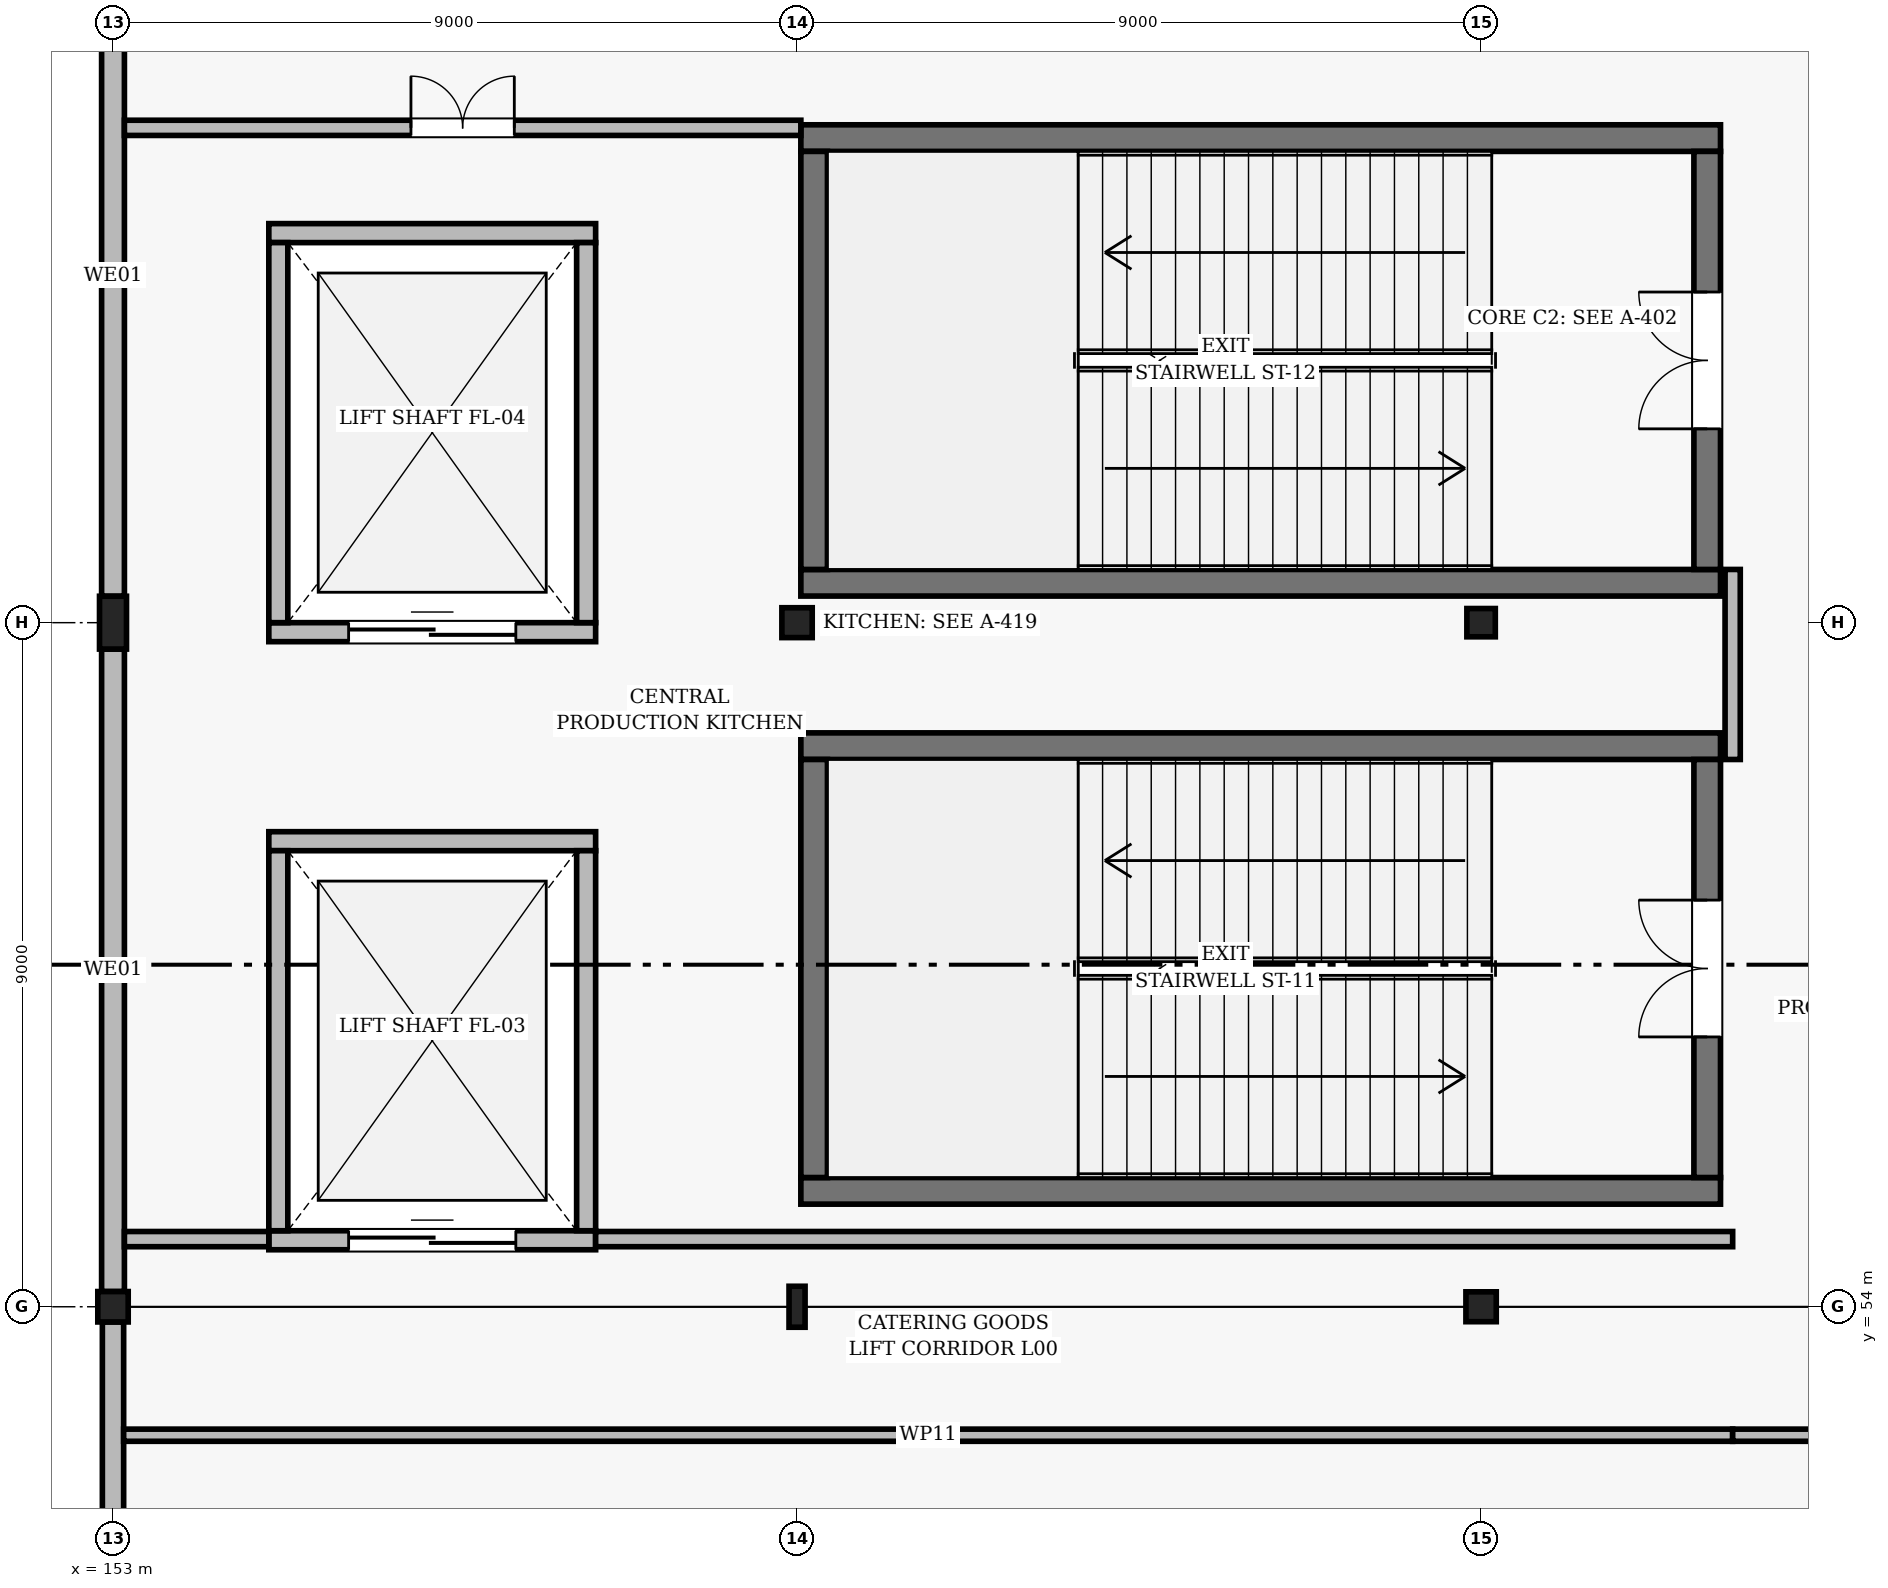
"""IFC4 building model, lengths in metres.
Left out: names, types, materials, properties, quantities, classifications, styles, units other than length and angle.
Written with IfcOpenShell. Run it as: python <this file> out.ifc"""

import sys

from ifc_helpers import new_model, si_unit, direction, frame, frame_2d, origin, origin_2d, place, context, subcontext, project, spatial, rectangle, hollow_rectangle, i_section, extrude, element, fill, save


model = new_model("IFC4")
c1 = context("Model", 3, precision=1e-05, world=origin(), true_north=direction((0.0, 1.0)))
c2 = subcontext(c1, "Body", "Model", "MODEL_VIEW")
j1 = project(units=[si_unit("LENGTHUNIT", "METRE"), si_unit("PLANEANGLEUNIT", "RADIAN")], contexts=[c1])
p1 = place(None, origin())
s1 = spatial("IfcSite", under=j1, at=p1, CompositionType="ELEMENT")
p2 = place(p1, origin())
s2 = spatial("IfcBuilding", under=s1, at=p2, CompositionType="ELEMENT")
p3 = place(p2, origin())
s3 = spatial("IfcBuildingStorey", under=s2, at=p3, CompositionType="ELEMENT", Elevation=0.0)
p4 = place(p3, frame((153.0, 54.0, 0.0), z_axis=(0.0, 0.0, 1.0), x_axis=(1.0, 0.0, 0.0)))
e1 = element("IfcColumn", 1, at=p4, inside=s3, PredefinedType="COLUMN", context=c2, shape_type="SweptSolid", body=[
    extrude(hollow_rectangle(XDim=0.4, YDim=0.4, WallThickness=0.016, InnerFilletRadius=0.016, OuterFilletRadius=0.032, at=origin_2d()), origin(), (0.0, 0.0, 1.0), 5.4),
])
p5 = place(p3, frame((153.0, 63.0, 0.0), z_axis=(0.0, 0.0, 1.0), x_axis=(1.0, 0.0, 0.0)))
e2 = element("IfcColumn", 2, at=p5, inside=s3, PredefinedType="COLUMN", context=c2, shape_type="SweptSolid", body=[
    extrude(i_section(OverallWidth=0.355, OverallDepth=0.695, WebThickness=0.015, FlangeThickness=0.025, FilletRadius=0.018, at=origin_2d()), origin(), (0.0, 0.0, 1.0), 5.4),
])
p6 = place(p3, frame((162.0, 54.0, 0.0), z_axis=(0.0, 0.0, 1.0), x_axis=(1.0, 0.0, 0.0)))
e3 = element("IfcColumn", 3, at=p6, inside=s3, PredefinedType="COLUMN", context=c2, shape_type="SweptSolid", body=[
    extrude(i_section(OverallWidth=0.211, OverallDepth=0.539, WebThickness=0.012, FlangeThickness=0.019, FilletRadius=0.014, at=origin_2d()), origin(), (0.0, 0.0, 1.0), 5.4),
])
for number, where, z_axis, x_axis in (
    (4, (162.0, 63.0, 0.0), (0.0, 0.0, 1.0), (1.0, 0.0, 0.0)),
    (5, (171.0, 54.0, 0.0), (0.0, 0.0, 1.0), (1.0, 0.0, 0.0)),
):
    element("IfcColumn", number, at=place(p3, frame(where, z_axis=z_axis, x_axis=x_axis)), inside=s3, PredefinedType="COLUMN", context=c2, shape_type="SweptSolid", body=[
        extrude(i_section(OverallWidth=0.399, OverallDepth=0.393, WebThickness=0.023, FlangeThickness=0.037, FilletRadius=0.018, at=origin_2d()), origin(), (0.0, 0.0, 1.0), 5.4),
    ])
p7 = place(p3, frame((171.0, 63.0, 0.0), z_axis=(0.0, 0.0, 1.0), x_axis=(1.0, 0.0, 0.0)))
e6 = element("IfcColumn", 6, at=p7, inside=s3, PredefinedType="COLUMN", context=c2, shape_type="SweptSolid", body=[
    extrude(i_section(OverallWidth=0.374, OverallDepth=0.372, WebThickness=0.016, FlangeThickness=0.026, FilletRadius=0.016, at=origin_2d()), origin(), (0.0, 0.0, 1.0), 5.4),
])
p8 = place(p3, frame((153.0, 45.55, 0.0), z_axis=(0.0, 0.0, 1.0), x_axis=(0.0, 1.0, 0.0)))
e7 = element("IfcWall", 7, at=p8, inside=s3, PredefinedType="SOLIDWALL", context=c2, shape_type="SweptSolid", body=[
    extrude(rectangle(XDim=8.25, YDim=0.28, at=frame_2d((4.125, 0.0))), origin(), (0.0, 0.0, 1.0), 4.554),
])
p9 = place(p8, frame((2.915, 0.0, 0.0)))
e8 = element("IfcOpeningElement", 8, at=p9, cuts=e7, PredefinedType="OPENING", context=c2, shape_type="SweptSolid", body=[
    extrude(rectangle(XDim=2.42, YDim=2.4, at=frame_2d((1.21, 1.2))), frame((0.0, 0.15, 0.0), z_axis=(0.0, -1.0, 0.0), x_axis=(1.0, 0.0, 0.0)), (0.0, 0.0, 1.0), 0.3),
])
p10 = place(p3, frame((153.0, 54.2, 0.0), z_axis=(0.0, 0.0, 1.0), x_axis=(0.0, 1.0, 0.0)))
e9 = element("IfcWall", 9, at=p10, inside=s3, PredefinedType="SOLIDWALL", context=c2, shape_type="SweptSolid", body=[
    extrude(rectangle(XDim=8.453, YDim=0.3, at=frame_2d((4.226, 0.0))), origin(), (0.0, 0.0, 1.0), 4.392),
])
p11 = place(p3, frame((153.0, 63.347, 0.0), z_axis=(0.0, 0.0, 1.0), x_axis=(0.0, 1.0, 0.0)))
e10 = element("IfcWall", 10, at=p11, inside=s3, PredefinedType="SOLIDWALL", context=c2, shape_type="SweptSolid", body=[
    extrude(rectangle(XDim=8.44, YDim=0.3, at=frame_2d((4.22, 0.0))), origin(), (0.0, 0.0, 1.0), 4.47),
])
for number, where, z_axis, x_axis in (
    (11, (162.05, 55.525, 0.0), (0.0, 0.0, 1.0), (1.0, 0.0, 0.0)),
    (12, (174.15, 61.375, 0.0), (0.0, 0.0, 1.0), (-1.0, 0.0, 0.0)),
):
    element("IfcWall", number, at=place(p3, frame(where, z_axis=z_axis, x_axis=x_axis)), inside=s3, PredefinedType="SHEAR", context=c2, shape_type="SweptSolid", body=[
        extrude(rectangle(XDim=12.1, YDim=0.35, at=frame_2d((6.05, 0.0))), origin(), (0.0, 0.0, 1.0), 5.18),
    ])
p12 = place(p3, frame((162.225, 61.2, 0.0), z_axis=(0.0, 0.0, 1.0), x_axis=(0.0, -1.0, 0.0)))
e13 = element("IfcWall", 13, at=p12, inside=s3, PredefinedType="SHEAR", context=c2, shape_type="SweptSolid", body=[
    extrude(rectangle(XDim=5.5, YDim=0.35, at=frame_2d((2.75, 0.0))), origin(), (0.0, 0.0, 1.0), 5.18),
])
p13 = place(p3, frame((173.975, 55.7, 0.0), z_axis=(0.0, 0.0, 1.0), x_axis=(0.0, 1.0, 0.0)))
e14 = element("IfcWall", 14, at=p13, inside=s3, PredefinedType="SHEAR", context=c2, shape_type="SweptSolid", body=[
    extrude(rectangle(XDim=5.5, YDim=0.35, at=frame_2d((2.75, 0.0))), origin(), (0.0, 0.0, 1.0), 5.18),
])
p14 = place(p13, frame((1.85, 0.0, 0.0)))
e15 = element("IfcOpeningElement", 15, at=p14, cuts=e14, PredefinedType="OPENING", context=c2, shape_type="SweptSolid", body=[
    extrude(rectangle(XDim=1.8, YDim=2.2, at=frame_2d((0.9, 1.1))), frame((0.0, 0.185, 0.0), z_axis=(0.0, -1.0, 0.0), x_axis=(1.0, 0.0, 0.0)), (0.0, 0.0, 1.0), 0.37),
])
for number, where, z_axis, x_axis in (
    (16, (162.05, 63.525, 0.0), (0.0, 0.0, 1.0), (1.0, 0.0, 0.0)),
    (17, (174.15, 69.375, 0.0), (0.0, 0.0, 1.0), (-1.0, 0.0, 0.0)),
):
    element("IfcWall", number, at=place(p3, frame(where, z_axis=z_axis, x_axis=x_axis)), inside=s3, PredefinedType="SHEAR", context=c2, shape_type="SweptSolid", body=[
        extrude(rectangle(XDim=12.1, YDim=0.35, at=frame_2d((6.05, 0.0))), origin(), (0.0, 0.0, 1.0), 5.18),
    ])
p15 = place(p3, frame((162.225, 69.2, 0.0), z_axis=(0.0, 0.0, 1.0), x_axis=(0.0, -1.0, 0.0)))
e18 = element("IfcWall", 18, at=p15, inside=s3, PredefinedType="SHEAR", context=c2, shape_type="SweptSolid", body=[
    extrude(rectangle(XDim=5.5, YDim=0.35, at=frame_2d((2.75, 0.0))), origin(), (0.0, 0.0, 1.0), 5.18),
])
p16 = place(p3, frame((173.975, 63.7, 0.0), z_axis=(0.0, 0.0, 1.0), x_axis=(0.0, 1.0, 0.0)))
e19 = element("IfcWall", 19, at=p16, inside=s3, PredefinedType="SHEAR", context=c2, shape_type="SweptSolid", body=[
    extrude(rectangle(XDim=5.5, YDim=0.35, at=frame_2d((2.75, 0.0))), origin(), (0.0, 0.0, 1.0), 5.18),
])
p17 = place(p16, frame((1.85, 0.0, 0.0)))
e20 = element("IfcOpeningElement", 20, at=p17, cuts=e19, PredefinedType="OPENING", context=c2, shape_type="SweptSolid", body=[
    extrude(rectangle(XDim=1.8, YDim=2.2, at=frame_2d((0.9, 1.1))), frame((0.0, 0.185, 0.0), z_axis=(0.0, -1.0, 0.0), x_axis=(1.0, 0.0, 0.0)), (0.0, 0.0, 1.0), 0.37),
])
p18 = place(p3, frame((155.05, 54.875, 0.0), z_axis=(0.0, 0.0, 1.0), x_axis=(1.0, 0.0, 0.0)))
e21 = element("IfcWall", 21, at=p18, inside=s3, PredefinedType="SOLIDWALL", context=c2, shape_type="SweptSolid", body=[
    extrude(rectangle(XDim=4.3, YDim=0.25, at=frame_2d((2.15, 0.0))), origin(), (0.0, 0.0, 1.0), 5.18),
])
p19 = place(p18, frame((1.05, 0.0, 0.0)))
e22 = element("IfcOpeningElement", 22, at=p19, cuts=e21, PredefinedType="OPENING", context=c2, shape_type="SweptSolid", body=[
    extrude(rectangle(XDim=2.2, YDim=2.5, at=frame_2d((1.1, 1.25))), frame((0.0, 0.135, 0.0), z_axis=(0.0, -1.0, 0.0), x_axis=(1.0, 0.0, 0.0)), (0.0, 0.0, 1.0), 0.27),
])
p20 = place(p3, frame((159.35, 60.125, 0.0), z_axis=(0.0, 0.0, 1.0), x_axis=(-1.0, 0.0, 0.0)))
e23 = element("IfcWall", 23, at=p20, inside=s3, PredefinedType="SOLIDWALL", context=c2, shape_type="SweptSolid", body=[
    extrude(rectangle(XDim=4.3, YDim=0.25, at=frame_2d((2.15, 0.0))), origin(), (0.0, 0.0, 1.0), 5.18),
])
for number, where, z_axis, x_axis in (
    (24, (155.175, 60.0, 0.0), (0.0, 0.0, 1.0), (0.0, -1.0, 0.0)),
    (25, (159.225, 55.0, 0.0), (0.0, 0.0, 1.0), (0.0, 1.0, 0.0)),
):
    element("IfcWall", number, at=place(p3, frame(where, z_axis=z_axis, x_axis=x_axis)), inside=s3, PredefinedType="SOLIDWALL", context=c2, shape_type="SweptSolid", body=[
        extrude(rectangle(XDim=5.0, YDim=0.25, at=frame_2d((2.5, 0.0))), origin(), (0.0, 0.0, 1.0), 5.18),
    ])
p21 = place(p3, frame((155.05, 62.875, 0.0), z_axis=(0.0, 0.0, 1.0), x_axis=(1.0, 0.0, 0.0)))
e26 = element("IfcWall", 26, at=p21, inside=s3, PredefinedType="SOLIDWALL", context=c2, shape_type="SweptSolid", body=[
    extrude(rectangle(XDim=4.3, YDim=0.25, at=frame_2d((2.15, 0.0))), origin(), (0.0, 0.0, 1.0), 5.18),
])
p22 = place(p21, frame((1.05, 0.0, 0.0)))
e27 = element("IfcOpeningElement", 27, at=p22, cuts=e26, PredefinedType="OPENING", context=c2, shape_type="SweptSolid", body=[
    extrude(rectangle(XDim=2.2, YDim=2.5, at=frame_2d((1.1, 1.25))), frame((0.0, 0.135, 0.0), z_axis=(0.0, -1.0, 0.0), x_axis=(1.0, 0.0, 0.0)), (0.0, 0.0, 1.0), 0.27),
])
p23 = place(p3, frame((159.35, 68.125, 0.0), z_axis=(0.0, 0.0, 1.0), x_axis=(-1.0, 0.0, 0.0)))
e28 = element("IfcWall", 28, at=p23, inside=s3, PredefinedType="SOLIDWALL", context=c2, shape_type="SweptSolid", body=[
    extrude(rectangle(XDim=4.3, YDim=0.25, at=frame_2d((2.15, 0.0))), origin(), (0.0, 0.0, 1.0), 5.18),
])
for number, where, z_axis, x_axis in (
    (29, (155.175, 68.0, 0.0), (0.0, 0.0, 1.0), (0.0, -1.0, 0.0)),
    (30, (159.225, 63.0, 0.0), (0.0, 0.0, 1.0), (0.0, 1.0, 0.0)),
):
    element("IfcWall", number, at=place(p3, frame(where, z_axis=z_axis, x_axis=x_axis)), inside=s3, PredefinedType="SOLIDWALL", context=c2, shape_type="SweptSolid", body=[
        extrude(rectangle(XDim=5.0, YDim=0.25, at=frame_2d((2.5, 0.0))), origin(), (0.0, 0.0, 1.0), 5.18),
    ])
p24 = place(p3, frame((153.15, 69.51, 0.0), z_axis=(0.0, 0.0, 1.0), x_axis=(1.0, 0.0, 0.0)))
e31 = element("IfcWall", 31, at=p24, inside=s3, PredefinedType="PARTITIONING", context=c2, shape_type="SweptSolid", body=[
    extrude(rectangle(XDim=8.9, YDim=0.2, at=frame_2d((4.45, 0.0))), origin(), (0.0, 0.0, 1.0), 4.47),
])
p25 = place(p24, frame((3.77, 0.0, 0.0)))
e32 = element("IfcOpeningElement", 32, at=p25, cuts=e31, PredefinedType="OPENING", context=c2, shape_type="SweptSolid", body=[
    extrude(rectangle(XDim=1.36, YDim=2.28, at=frame_2d((0.68, 1.14))), frame((0.0, 0.11, 0.0), z_axis=(0.0, -1.0, 0.0), x_axis=(1.0, 0.0, 0.0)), (0.0, 0.0, 1.0), 0.22),
])
p26 = place(p3, frame((174.31, 63.7, 0.0), z_axis=(0.0, 0.0, 1.0), x_axis=(0.0, -1.0, 0.0)))
e33 = element("IfcWall", 33, at=p26, inside=s3, PredefinedType="PARTITIONING", context=c2, shape_type="SweptSolid", body=[
    extrude(rectangle(XDim=2.5, YDim=0.2, at=frame_2d((1.25, 0.0))), origin(), (0.0, 0.0, 1.0), 4.47),
])
p27 = place(p3, frame((174.31, 54.89, 0.0), z_axis=(0.0, 0.0, 1.0), x_axis=(-1.0, 0.0, 0.0)))
e34 = element("IfcWall", 34, at=p27, inside=s3, PredefinedType="PARTITIONING", context=c2, shape_type="SweptSolid", body=[
    extrude(rectangle(XDim=14.96, YDim=0.2, at=frame_2d((7.48, 0.0))), origin(), (0.0, 0.0, 1.0), 4.481),
])
p28 = place(p3, frame((155.05, 54.89, 0.0), z_axis=(0.0, 0.0, 1.0), x_axis=(-1.0, 0.0, 0.0)))
e35 = element("IfcWall", 35, at=p28, inside=s3, PredefinedType="PARTITIONING", context=c2, shape_type="SweptSolid", body=[
    extrude(rectangle(XDim=1.9, YDim=0.2, at=frame_2d((0.95, 0.0))), origin(), (0.0, 0.0, 1.0), 4.392),
])
p29 = place(p3, frame((153.14, 52.31, 0.0), z_axis=(0.0, 0.0, 1.0), x_axis=(1.0, 0.0, 0.0)))
e36 = element("IfcWall", 36, at=p29, inside=s3, PredefinedType="PARTITIONING", context=c2, shape_type="SweptSolid", body=[
    extrude(rectangle(XDim=21.17, YDim=0.16, at=frame_2d((10.585, 0.0))), origin(), (0.0, 0.0, 1.0), 4.31),
])
p30 = place(p3, frame((174.31, 52.31, 0.0), z_axis=(0.0, 0.0, 1.0), x_axis=(1.0, 0.0, 0.0)))
e37 = element("IfcWall", 37, at=p30, inside=s3, PredefinedType="PARTITIONING", context=c2, shape_type="SweptSolid", body=[
    extrude(rectangle(XDim=4.94, YDim=0.16, at=frame_2d((2.47, 0.0))), origin(), (0.0, 0.0, 1.0), 4.708),
])
p31 = place(p14, origin())
e38 = element("IfcDoor", 38, at=p31, inside=s3, OperationType="DOUBLE_DOOR_SINGLE_SWING", PredefinedType="DOOR", context=c2, shape_type="SweptSolid", body=[
    extrude(rectangle(XDim=1.8, YDim=2.2, at=frame_2d((0.9, 1.1))), frame((0.0, 0.025, 0.0), z_axis=(0.0, -1.0, 0.0), x_axis=(1.0, 0.0, 0.0)), (0.0, 0.0, 1.0), 0.05),
])
fill(e15, e38)
p32 = place(p17, origin())
e39 = element("IfcDoor", 39, at=p32, inside=s3, OperationType="DOUBLE_DOOR_SINGLE_SWING", PredefinedType="DOOR", context=c2, shape_type="SweptSolid", body=[
    extrude(rectangle(XDim=1.8, YDim=2.2, at=frame_2d((0.9, 1.1))), frame((0.0, 0.025, 0.0), z_axis=(0.0, -1.0, 0.0), x_axis=(1.0, 0.0, 0.0)), (0.0, 0.0, 1.0), 0.05),
])
fill(e20, e39)
p33 = place(p19, origin())
e40 = element("IfcDoor", 40, at=p33, inside=s3, OperationType="DOUBLE_DOOR_SLIDING", PredefinedType="DOOR", context=c2, shape_type="SweptSolid", body=[
    extrude(rectangle(XDim=2.2, YDim=2.5, at=frame_2d((1.1, 1.25))), frame((0.0, 0.025, 0.0), z_axis=(0.0, -1.0, 0.0), x_axis=(1.0, 0.0, 0.0)), (0.0, 0.0, 1.0), 0.05),
])
fill(e22, e40)
p34 = place(p22, origin())
e41 = element("IfcDoor", 41, at=p34, inside=s3, OperationType="DOUBLE_DOOR_SLIDING", PredefinedType="DOOR", context=c2, shape_type="SweptSolid", body=[
    extrude(rectangle(XDim=2.2, YDim=2.5, at=frame_2d((1.1, 1.25))), frame((0.0, 0.025, 0.0), z_axis=(0.0, -1.0, 0.0), x_axis=(1.0, 0.0, 0.0)), (0.0, 0.0, 1.0), 0.05),
])
fill(e27, e41)
p35 = place(p25, origin())
e42 = element("IfcDoor", 42, at=p35, inside=s3, OperationType="DOUBLE_DOOR_SINGLE_SWING", PredefinedType="DOOR", context=c2, shape_type="SweptSolid", body=[
    extrude(rectangle(XDim=1.36, YDim=2.28, at=frame_2d((0.68, 1.14))), frame((0.0, 0.025, 0.0), z_axis=(0.0, -1.0, 0.0), x_axis=(1.0, 0.0, 0.0)), (0.0, 0.0, 1.0), 0.05),
])
fill(e32, e42)
save(model, sys.argv[1])
